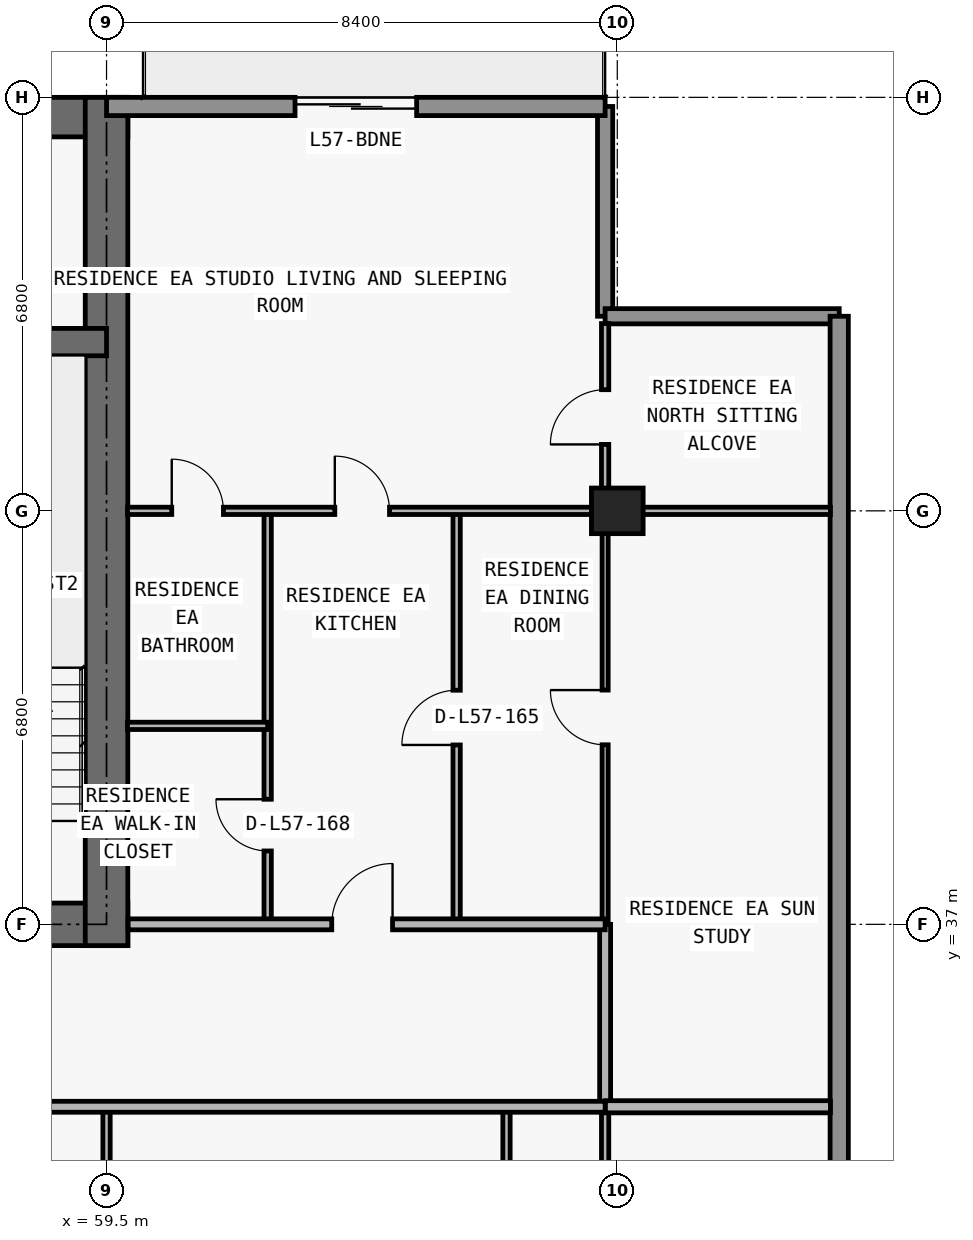
"""IFC4 building model, lengths in metres.
Left out: names, types, materials, properties, quantities, classifications, styles, units other than length and angle.
Written with IfcOpenShell. Run it as: python <this file> out.ifc"""

import sys

from ifc_helpers import new_model, si_unit, direction, frame, frame_2d, origin, origin_2d, place, context, subcontext, project, spatial, rectangle, extrude, element, fill, save


model = new_model("IFC4")
c1 = context("Model", 3, precision=1e-05, world=origin(), true_north=direction((0.0, 1.0)))
c2 = subcontext(c1, "Body", "Model", "MODEL_VIEW")
j1 = project(units=[si_unit("LENGTHUNIT", "METRE"), si_unit("PLANEANGLEUNIT", "RADIAN")], contexts=[c1])
p1 = place(None, origin())
s1 = spatial("IfcSite", under=j1, at=p1, CompositionType="ELEMENT")
p2 = place(p1, origin())
s2 = spatial("IfcBuilding", under=s1, at=p2, CompositionType="ELEMENT")
p3 = place(p2, frame((0.0, 0.0, 204.9)))
s3 = spatial("IfcBuildingStorey", under=s2, at=p3, CompositionType="ELEMENT", Elevation=204.9)
p4 = place(p3, frame((67.9, 43.8, 0.0), z_axis=(0.0, 0.0, 1.0), x_axis=(1.0, 0.0, 0.0)))
e1 = element("IfcColumn", 1, at=p4, inside=s3, PredefinedType="COLUMN", context=c2, shape_type="SweptSolid", body=[
    extrude(rectangle(XDim=0.85, YDim=0.75, at=origin_2d()), origin(), (0.0, 0.0, 1.0), 3.05),
])
p5 = place(p3, frame((17.95, 37.0, 0.0), z_axis=(0.0, 0.0, 1.0), x_axis=(1.0, 0.0, 0.0)))
e2 = element("IfcWall", 2, at=p5, inside=s3, PredefinedType="SHEAR", context=c2, shape_type="SweptSolid", body=[
    extrude(rectangle(XDim=41.9, YDim=0.7, at=frame_2d((20.95, 0.0))), origin(), (0.0, 0.0, 1.0), 3.05),
])
p6 = place(p5, frame((14.35, 0.0, 0.0)))
e3 = element("IfcOpeningElement", 3, at=p6, cuts=e2, PredefinedType="OPENING", context=c2, shape_type="SweptSolid", body=[
    extrude(rectangle(XDim=1.1, YDim=2.15, at=frame_2d((0.55, 1.075))), frame((0.0, 0.36, 0.0), z_axis=(0.0, -1.0, 0.0), x_axis=(1.0, 0.0, 0.0)), (0.0, 0.0, 1.0), 0.72),
])
p7 = place(p5, frame((6.2, 0.0, 0.0)))
e4 = element("IfcOpeningElement", 4, at=p7, cuts=e2, PredefinedType="OPENING", context=c2, shape_type="SweptSolid", body=[
    extrude(rectangle(XDim=1.05, YDim=2.15, at=frame_2d((0.525, 1.075))), frame((0.0, 0.36, 0.0), z_axis=(0.0, -1.0, 0.0), x_axis=(1.0, 0.0, 0.0)), (0.0, 0.0, 1.0), 0.72),
])
p8 = place(p5, frame((34.7, 0.0, 0.0)))
e5 = element("IfcOpeningElement", 5, at=p8, cuts=e2, PredefinedType="OPENING", context=c2, shape_type="SweptSolid", body=[
    extrude(rectangle(XDim=1.05, YDim=2.15, at=frame_2d((0.525, 1.075))), frame((0.0, 0.36, 0.0), z_axis=(0.0, -1.0, 0.0), x_axis=(1.0, 0.0, 0.0)), (0.0, 0.0, 1.0), 0.72),
])
p9 = place(p5, frame((10.812, 0.0, 0.0)))
e6 = element("IfcOpeningElement", 6, at=p9, cuts=e2, PredefinedType="OPENING", context=c2, shape_type="SweptSolid", body=[
    extrude(rectangle(XDim=1.05, YDim=2.15, at=frame_2d((0.525, 1.075))), frame((0.0, 0.36, 0.0), z_axis=(0.0, -1.0, 0.0), x_axis=(1.0, 0.0, 0.0)), (0.0, 0.0, 1.0), 0.72),
])
p10 = place(p5, frame((24.05, 0.0, 0.0)))
e7 = element("IfcOpeningElement", 7, at=p10, cuts=e2, PredefinedType="OPENING", context=c2, shape_type="SweptSolid", body=[
    extrude(rectangle(XDim=1.05, YDim=2.15, at=frame_2d((0.525, 1.075))), frame((0.0, 0.36, 0.0), z_axis=(0.0, -1.0, 0.0), x_axis=(1.0, 0.0, 0.0)), (0.0, 0.0, 1.0), 0.72),
])
p11 = place(p3, frame((17.95, 50.275, 0.0), z_axis=(0.0, 0.0, 1.0), x_axis=(1.0, 0.0, 0.0)))
e8 = element("IfcWall", 8, at=p11, inside=s3, PredefinedType="SHEAR", context=c2, shape_type="SweptSolid", body=[
    extrude(rectangle(XDim=41.9, YDim=0.65, at=frame_2d((20.95, 0.0))), origin(), (0.0, 0.0, 1.0), 3.05),
])
p12 = place(p3, frame((59.5, 36.65, 0.0), z_axis=(0.0, 0.0, 1.0), x_axis=(0.0, 1.0, 0.0)))
e9 = element("IfcWall", 9, at=p12, inside=s3, PredefinedType="SHEAR", context=c2, shape_type="SweptSolid", body=[
    extrude(rectangle(XDim=13.95, YDim=0.7, at=frame_2d((6.975, 0.0))), origin(), (0.0, 0.0, 1.0), 3.05),
])
p13 = place(p3, frame((18.3, 46.575, 0.0), z_axis=(0.0, 0.0, 1.0), x_axis=(1.0, 0.0, 0.0)))
e10 = element("IfcWall", 10, at=p13, inside=s3, PredefinedType="SHEAR", context=c2, shape_type="SweptSolid", body=[
    extrude(rectangle(XDim=41.2, YDim=0.45, at=frame_2d((20.6, 0.0))), origin(), (0.0, 0.0, 1.0), 3.05),
])
p14 = place(p13, frame((7.6, 0.0, 0.0)))
e11 = element("IfcOpeningElement", 11, at=p14, cuts=e10, PredefinedType="OPENING", context=c2, shape_type="SweptSolid", body=[
    extrude(rectangle(XDim=1.0, YDim=2.2, at=frame_2d((0.5, 1.1))), frame((0.0, 0.235, 0.0), z_axis=(0.0, -1.0, 0.0), x_axis=(1.0, 0.0, 0.0)), (0.0, 0.0, 1.0), 0.47),
])
p15 = place(p13, frame((32.625, 0.0, 0.0)))
e12 = element("IfcOpeningElement", 12, at=p15, cuts=e10, PredefinedType="OPENING", context=c2, shape_type="SweptSolid", body=[
    extrude(rectangle(XDim=1.05, YDim=2.15, at=frame_2d((0.525, 1.075))), frame((0.0, 0.235, 0.0), z_axis=(0.0, -1.0, 0.0), x_axis=(1.0, 0.0, 0.0)), (0.0, 0.0, 1.0), 0.47),
])
p16 = place(p3, frame((67.7, 50.45, 0.0), z_axis=(0.0, 0.0, 1.0), x_axis=(0.0, -1.0, 0.0)))
e13 = element("IfcWall", 13, at=p16, inside=s3, PredefinedType="ELEMENTEDWALL", context=c2, shape_type="SweptSolid", body=[
    extrude(rectangle(XDim=3.45, YDim=0.25, at=frame_2d((1.725, 0.0))), origin(), (0.0, 0.0, 1.0), 3.05),
])
p17 = place(p3, frame((67.7, 47.0, 0.0), z_axis=(0.0, 0.0, 1.0), x_axis=(1.0, 0.0, 0.0)))
e14 = element("IfcWall", 14, at=p17, inside=s3, PredefinedType="ELEMENTEDWALL", context=c2, shape_type="SweptSolid", body=[
    extrude(rectangle(XDim=3.85, YDim=0.25, at=frame_2d((1.925, 0.0))), origin(), (0.0, 0.0, 1.0), 3.05),
])
p18 = place(p3, frame((71.55, 47.0, 0.0), z_axis=(0.0, 0.0, 1.0), x_axis=(0.0, -1.0, 0.0)))
e15 = element("IfcWall", 15, at=p18, inside=s3, PredefinedType="STANDARD", context=c2, shape_type="SweptSolid", body=[
    extrude(rectangle(XDim=17.9, YDim=0.3, at=frame_2d((8.95, 0.0))), origin(), (0.0, 0.0, 1.0), 3.05),
])
p19 = place(p3, frame((59.5, 50.45, 0.0), z_axis=(0.0, 0.0, 1.0), x_axis=(1.0, 0.0, 0.0)))
e16 = element("IfcWall", 16, at=p19, inside=s3, PredefinedType="STANDARD", context=c2, shape_type="SweptSolid", body=[
    extrude(rectangle(XDim=8.2, YDim=0.3, at=frame_2d((4.1, 0.0))), origin(), (0.0, 0.0, 1.0), 3.05),
])
p20 = place(p19, frame((3.1, 0.0, 0.0)))
e17 = element("IfcOpeningElement", 17, at=p20, cuts=e16, PredefinedType="OPENING", context=c2, shape_type="SweptSolid", body=[
    extrude(rectangle(XDim=2.0, YDim=2.3, at=frame_2d((1.0, 1.15))), frame((0.0, 0.16, 0.0), z_axis=(0.0, -1.0, 0.0), x_axis=(1.0, 0.0, 0.0)), (0.0, 0.0, 1.0), 0.32),
])
p21 = place(p3, frame((59.5, 11.24, 0.0), z_axis=(0.0, 0.0, 1.0), x_axis=(0.0, 1.0, 0.0)))
e18 = element("IfcWall", 18, at=p21, inside=s3, PredefinedType="PARTITIONING", context=c2, shape_type="SweptSolid", body=[
    extrude(rectangle(XDim=22.76, YDim=0.12, at=frame_2d((11.38, 0.0))), origin(), (0.0, 0.0, 1.0), 2.263),
])
p22 = place(p21, frame((14.19, 0.0, 0.0)))
e19 = element("IfcOpeningElement", 19, at=p22, cuts=e18, PredefinedType="OPENING", context=c2, shape_type="SweptSolid", body=[
    extrude(rectangle(XDim=0.9, YDim=2.15, at=frame_2d((0.45, 1.075))), frame((0.0, 0.07, 0.0), z_axis=(0.0, -1.0, 0.0), x_axis=(1.0, 0.0, 0.0)), (0.0, 0.0, 1.0), 0.14),
])
p23 = place(p3, frame((62.15, 37.0, 0.0), z_axis=(0.0, 0.0, 1.0), x_axis=(0.0, 1.0, 0.0)))
e20 = element("IfcWall", 20, at=p23, inside=s3, PredefinedType="PARTITIONING", context=c2, shape_type="SweptSolid", body=[
    extrude(rectangle(XDim=6.8, YDim=0.12, at=frame_2d((3.4, 0.0))), origin(), (0.0, 0.0, 1.0), 3.05),
])
p24 = place(p23, frame((1.207, 0.0, 0.0)))
e21 = element("IfcOpeningElement", 21, at=p24, cuts=e20, PredefinedType="OPENING", context=c2, shape_type="SweptSolid", body=[
    extrude(rectangle(XDim=0.85, YDim=2.1, at=frame_2d((0.425, 1.05))), frame((0.0, 0.07, 0.0), z_axis=(0.0, -1.0, 0.0), x_axis=(1.0, 0.0, 0.0)), (0.0, 0.0, 1.0), 0.14),
])
p25 = place(p3, frame((65.258, 37.0, 0.0), z_axis=(0.0, 0.0, 1.0), x_axis=(0.0, 1.0, 0.0)))
e22 = element("IfcWall", 22, at=p25, inside=s3, PredefinedType="PARTITIONING", context=c2, shape_type="SweptSolid", body=[
    extrude(rectangle(XDim=6.8, YDim=0.12, at=frame_2d((3.4, 0.0))), origin(), (0.0, 0.0, 1.0), 3.05),
])
p26 = place(p25, frame((2.95, 0.0, 0.0)))
e23 = element("IfcOpeningElement", 23, at=p26, cuts=e22, PredefinedType="OPENING", context=c2, shape_type="SweptSolid", body=[
    extrude(rectangle(XDim=0.9, YDim=2.15, at=frame_2d((0.45, 1.075))), frame((0.0, 0.07, 0.0), z_axis=(0.0, -1.0, 0.0), x_axis=(1.0, 0.0, 0.0)), (0.0, 0.0, 1.0), 0.14),
])
p27 = place(p3, frame((66.078, 28.08, 0.0), z_axis=(0.0, 0.0, 1.0), x_axis=(0.0, 1.0, 0.0)))
e24 = element("IfcWall", 24, at=p27, inside=s3, PredefinedType="PARTITIONING", context=c2, shape_type="SweptSolid", body=[
    extrude(rectangle(XDim=5.92, YDim=0.12, at=frame_2d((2.96, 0.0))), origin(), (0.0, 0.0, 1.0), 2.725),
])
p28 = place(p27, frame((2.535, 0.0, 0.0)))
e25 = element("IfcOpeningElement", 25, at=p28, cuts=e24, PredefinedType="OPENING", context=c2, shape_type="SweptSolid", body=[
    extrude(rectangle(XDim=0.85, YDim=2.1, at=frame_2d((0.425, 1.05))), frame((0.0, 0.07, 0.0), z_axis=(0.0, -1.0, 0.0), x_axis=(1.0, 0.0, 0.0)), (0.0, 0.0, 1.0), 0.14),
])
p29 = place(p3, frame((67.7, 11.32, 0.0), z_axis=(0.0, 0.0, 1.0), x_axis=(0.0, 1.0, 0.0)))
e26 = element("IfcWall", 26, at=p29, inside=s3, PredefinedType="PARTITIONING", context=c2, shape_type="SweptSolid", body=[
    extrude(rectangle(XDim=22.68, YDim=0.12, at=frame_2d((11.34, 0.0))), origin(), (0.0, 0.0, 1.0), 2.263),
])
p30 = place(p29, frame((14.11, 0.0, 0.0)))
e27 = element("IfcOpeningElement", 27, at=p30, cuts=e26, PredefinedType="OPENING", context=c2, shape_type="SweptSolid", body=[
    extrude(rectangle(XDim=0.9, YDim=2.15, at=frame_2d((0.45, 1.075))), frame((0.0, 0.07, 0.0), z_axis=(0.0, -1.0, 0.0), x_axis=(1.0, 0.0, 0.0)), (0.0, 0.0, 1.0), 0.14),
])
p31 = place(p3, frame((67.7, 34.005, 0.0), z_axis=(0.0, 0.0, 1.0), x_axis=(0.0, 1.0, 0.0)))
e28 = element("IfcWall", 28, at=p31, inside=s3, PredefinedType="PARTITIONING", context=c2, shape_type="SweptSolid", body=[
    extrude(rectangle(XDim=2.995, YDim=0.18, at=frame_2d((1.498, 0.0))), origin(), (0.0, 0.0, 1.0), 2.263),
])
p32 = place(p3, frame((67.7, 37.005, 0.0), z_axis=(0.0, 0.0, 1.0), x_axis=(0.0, 1.0, 0.0)))
e29 = element("IfcWall", 29, at=p32, inside=s3, PredefinedType="MOVABLE", context=c2, shape_type="SweptSolid", body=[
    extrude(rectangle(XDim=6.795, YDim=0.1, at=frame_2d((3.397, 0.0))), origin(), (0.0, 0.0, 1.0), 2.263),
])
p33 = place(p32, frame((2.948, 0.0, 0.0)))
e30 = element("IfcOpeningElement", 30, at=p33, cuts=e29, PredefinedType="OPENING", context=c2, shape_type="SweptSolid", body=[
    extrude(rectangle(XDim=0.9, YDim=2.15, at=frame_2d((0.45, 1.075))), frame((0.0, 0.06, 0.0), z_axis=(0.0, -1.0, 0.0), x_axis=(1.0, 0.0, 0.0)), (0.0, 0.0, 1.0), 0.12),
])
p34 = place(p3, frame((67.7, 43.805, 0.0), z_axis=(0.0, 0.0, 1.0), x_axis=(0.0, 1.0, 0.0)))
e31 = element("IfcWall", 31, at=p34, inside=s3, PredefinedType="PARTITIONING", context=c2, shape_type="SweptSolid", body=[
    extrude(rectangle(XDim=3.075, YDim=0.12, at=frame_2d((1.538, 0.0))), origin(), (0.0, 0.0, 1.0), 3.05),
])
p35 = place(p34, frame((1.087, 0.0, 0.0)))
e32 = element("IfcOpeningElement", 32, at=p35, cuts=e31, PredefinedType="OPENING", context=c2, shape_type="SweptSolid", body=[
    extrude(rectangle(XDim=0.9, YDim=2.15, at=frame_2d((0.45, 1.075))), frame((0.0, 0.07, 0.0), z_axis=(0.0, -1.0, 0.0), x_axis=(1.0, 0.0, 0.0)), (0.0, 0.0, 1.0), 0.14),
])
p36 = place(p3, frame((10.105, 34.0, 0.0), z_axis=(0.0, 0.0, 1.0), x_axis=(1.0, 0.0, 0.0)))
e33 = element("IfcWall", 33, at=p36, inside=s3, PredefinedType="PARTITIONING", context=c2, shape_type="SweptSolid", body=[
    extrude(rectangle(XDim=57.595, YDim=0.18, at=frame_2d((28.797, 0.0))), origin(), (0.0, 0.0, 1.0), 3.05),
])
p37 = place(p36, frame((2.712, 0.0, 0.0)))
e34 = element("IfcOpeningElement", 34, at=p37, cuts=e33, PredefinedType="OPENING", context=c2, shape_type="SweptSolid", body=[
    extrude(rectangle(XDim=1.0, YDim=2.2, at=frame_2d((0.5, 1.1))), frame((0.0, 0.1, 0.0), z_axis=(0.0, -1.0, 0.0), x_axis=(1.0, 0.0, 0.0)), (0.0, 0.0, 1.0), 0.2),
])
p38 = place(p36, frame((19.391, 0.0, 0.0)))
e35 = element("IfcOpeningElement", 35, at=p38, cuts=e33, PredefinedType="OPENING", context=c2, shape_type="SweptSolid", body=[
    extrude(rectangle(XDim=1.0, YDim=2.2, at=frame_2d((0.5, 1.1))), frame((0.0, 0.1, 0.0), z_axis=(0.0, -1.0, 0.0), x_axis=(1.0, 0.0, 0.0)), (0.0, 0.0, 1.0), 0.2),
])
p39 = place(p36, frame((43.794, 0.0, 0.0)))
e36 = element("IfcOpeningElement", 36, at=p39, cuts=e33, PredefinedType="OPENING", context=c2, shape_type="SweptSolid", body=[
    extrude(rectangle(XDim=1.0, YDim=2.2, at=frame_2d((0.5, 1.1))), frame((0.0, 0.1, 0.0), z_axis=(0.0, -1.0, 0.0), x_axis=(1.0, 0.0, 0.0)), (0.0, 0.0, 1.0), 0.2),
])
p40 = place(p3, frame((67.705, 34.0, 0.0), z_axis=(0.0, 0.0, 1.0), x_axis=(1.0, 0.0, 0.0)))
e37 = element("IfcWall", 37, at=p40, inside=s3, PredefinedType="PARTITIONING", context=c2, shape_type="SweptSolid", body=[
    extrude(rectangle(XDim=3.7, YDim=0.2, at=frame_2d((1.85, 0.0))), origin(), (0.0, 0.0, 1.0), 3.05),
])
p41 = place(p3, frame((59.855, 37.0, 0.0), z_axis=(0.0, 0.0, 1.0), x_axis=(1.0, 0.0, 0.0)))
e38 = element("IfcWall", 38, at=p41, inside=s3, PredefinedType="PARTITIONING", context=c2, shape_type="SweptSolid", body=[
    extrude(rectangle(XDim=7.845, YDim=0.18, at=frame_2d((3.922, 0.0))), origin(), (0.0, 0.0, 1.0), 3.05),
])
p42 = place(p41, frame((3.349, 0.0, 0.0)))
e39 = element("IfcOpeningElement", 39, at=p42, cuts=e38, PredefinedType="OPENING", context=c2, shape_type="SweptSolid", body=[
    extrude(rectangle(XDim=1.0, YDim=2.2, at=frame_2d((0.5, 1.1))), frame((0.0, 0.1, 0.0), z_axis=(0.0, -1.0, 0.0), x_axis=(1.0, 0.0, 0.0)), (0.0, 0.0, 1.0), 0.2),
])
p43 = place(p3, frame((59.845, 40.264, 0.0), z_axis=(0.0, 0.0, 1.0), x_axis=(1.0, 0.0, 0.0)))
e40 = element("IfcWall", 40, at=p43, inside=s3, PredefinedType="PARTITIONING", context=c2, shape_type="SweptSolid", body=[
    extrude(rectangle(XDim=2.305, YDim=0.12, at=frame_2d((1.152, 0.0))), origin(), (0.0, 0.0, 1.0), 3.05),
])
p44 = place(p3, frame((59.845, 43.8, 0.0), z_axis=(0.0, 0.0, 1.0), x_axis=(1.0, 0.0, 0.0)))
e41 = element("IfcWall", 41, at=p44, inside=s3, PredefinedType="PARTITIONING", context=c2, shape_type="SweptSolid", body=[
    extrude(rectangle(XDim=11.56, YDim=0.12, at=frame_2d((5.78, 0.0))), origin(), (0.0, 0.0, 1.0), 2.418),
])
p45 = place(p44, frame((3.409, 0.0, 0.0)))
e42 = element("IfcOpeningElement", 42, at=p45, cuts=e41, PredefinedType="OPENING", context=c2, shape_type="SweptSolid", body=[
    extrude(rectangle(XDim=0.9, YDim=2.15, at=frame_2d((0.45, 1.075))), frame((0.0, 0.07, 0.0), z_axis=(0.0, -1.0, 0.0), x_axis=(1.0, 0.0, 0.0)), (0.0, 0.0, 1.0), 0.14),
])
p46 = place(p44, frame((0.728, 0.0, 0.0)))
e43 = element("IfcOpeningElement", 43, at=p46, cuts=e41, PredefinedType="OPENING", context=c2, shape_type="SweptSolid", body=[
    extrude(rectangle(XDim=0.85, YDim=2.1, at=frame_2d((0.425, 1.05))), frame((0.0, 0.07, 0.0), z_axis=(0.0, -1.0, 0.0), x_axis=(1.0, 0.0, 0.0)), (0.0, 0.0, 1.0), 0.14),
])
p47 = place(p20, origin())
e44 = element("IfcDoor", 44, at=p47, inside=s3, OperationType="DOUBLE_DOOR_SLIDING", PredefinedType="DOOR", context=c2, shape_type="SweptSolid", body=[
    extrude(rectangle(XDim=2.0, YDim=2.3, at=frame_2d((1.0, 1.15))), frame((0.0, 0.025, 0.0), z_axis=(0.0, -1.0, 0.0), x_axis=(1.0, 0.0, 0.0)), (0.0, 0.0, 1.0), 0.05),
])
fill(e17, e44)
p48 = place(p26, origin())
e45 = element("IfcDoor", 45, at=p48, inside=s3, OperationType="SINGLE_SWING_LEFT", PredefinedType="DOOR", context=c2, shape_type="SweptSolid", body=[
    extrude(rectangle(XDim=0.9, YDim=2.15, at=frame_2d((0.45, 1.075))), frame((0.0, 0.025, 0.0), z_axis=(0.0, -1.0, 0.0), x_axis=(1.0, 0.0, 0.0)), (0.0, 0.0, 1.0), 0.05),
])
fill(e23, e45)
p49 = place(p42, origin())
e46 = element("IfcDoor", 46, at=p49, inside=s3, OperationType="SINGLE_SWING_RIGHT", PredefinedType="DOOR", context=c2, shape_type="SweptSolid", body=[
    extrude(rectangle(XDim=1.0, YDim=2.2, at=frame_2d((0.5, 1.1))), frame((0.0, 0.025, 0.0), z_axis=(0.0, -1.0, 0.0), x_axis=(1.0, 0.0, 0.0)), (0.0, 0.0, 1.0), 0.05),
])
fill(e39, e46)
p50 = place(p45, origin())
e47 = element("IfcDoor", 47, at=p50, inside=s3, OperationType="SINGLE_SWING_LEFT", PredefinedType="DOOR", context=c2, shape_type="SweptSolid", body=[
    extrude(rectangle(XDim=0.9, YDim=2.15, at=frame_2d((0.45, 1.075))), frame((0.0, 0.025, 0.0), z_axis=(0.0, -1.0, 0.0), x_axis=(1.0, 0.0, 0.0)), (0.0, 0.0, 1.0), 0.05),
])
fill(e42, e47)
p51 = place(p24, origin())
e48 = element("IfcDoor", 48, at=p51, inside=s3, OperationType="SINGLE_SWING_RIGHT", PredefinedType="DOOR", context=c2, shape_type="SweptSolid", body=[
    extrude(rectangle(XDim=0.85, YDim=2.1, at=frame_2d((0.425, 1.05))), frame((0.0, 0.025, 0.0), z_axis=(0.0, -1.0, 0.0), x_axis=(1.0, 0.0, 0.0)), (0.0, 0.0, 1.0), 0.05),
])
fill(e21, e48)
p52 = place(p46, origin())
e49 = element("IfcDoor", 49, at=p52, inside=s3, OperationType="SINGLE_SWING_LEFT", PredefinedType="DOOR", context=c2, shape_type="SweptSolid", body=[
    extrude(rectangle(XDim=0.85, YDim=2.1, at=frame_2d((0.425, 1.05))), frame((0.0, 0.025, 0.0), z_axis=(0.0, -1.0, 0.0), x_axis=(1.0, 0.0, 0.0)), (0.0, 0.0, 1.0), 0.05),
])
fill(e43, e49)
p53 = place(p33, origin())
e50 = element("IfcDoor", 50, at=p53, inside=s3, OperationType="SINGLE_SWING_RIGHT", PredefinedType="DOOR", context=c2, shape_type="SweptSolid", body=[
    extrude(rectangle(XDim=0.9, YDim=2.15, at=frame_2d((0.45, 1.075))), frame((0.0, 0.025, 0.0), z_axis=(0.0, -1.0, 0.0), x_axis=(1.0, 0.0, 0.0)), (0.0, 0.0, 1.0), 0.05),
])
fill(e30, e50)
p54 = place(p35, origin())
e51 = element("IfcDoor", 51, at=p54, inside=s3, OperationType="SINGLE_SWING_LEFT", PredefinedType="DOOR", context=c2, shape_type="SweptSolid", body=[
    extrude(rectangle(XDim=0.9, YDim=2.15, at=frame_2d((0.45, 1.075))), frame((0.0, 0.025, 0.0), z_axis=(0.0, -1.0, 0.0), x_axis=(1.0, 0.0, 0.0)), (0.0, 0.0, 1.0), 0.05),
])
fill(e32, e51)
save(model, sys.argv[1])
